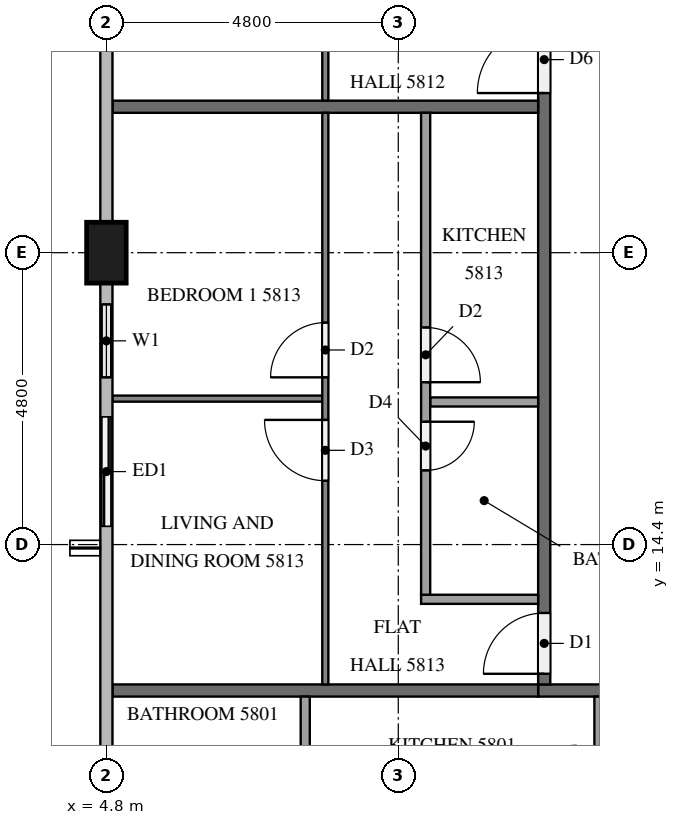
"""IFC4 building model, lengths in metres.
Left out: names, types, materials, properties, quantities, classifications, styles, units other than length and angle.
Written with IfcOpenShell. Run it as: python <this file> out.ifc"""

import sys

from ifc_helpers import new_model, si_unit, direction, frame, frame_2d, origin, origin_2d, place, context, subcontext, project, spatial, rectangle, extrude, element, fill, save


model = new_model("IFC4")
c1 = context("Model", 3, precision=1e-05, world=origin(), true_north=direction((0.0, 1.0)))
c2 = subcontext(c1, "Body", "Model", "MODEL_VIEW")
j1 = project(units=[si_unit("LENGTHUNIT", "METRE"), si_unit("PLANEANGLEUNIT", "RADIAN")], contexts=[c1])
p1 = place(None, origin())
s1 = spatial("IfcSite", under=j1, at=p1, CompositionType="ELEMENT")
p2 = place(p1, origin())
s2 = spatial("IfcBuilding", under=s1, at=p2, CompositionType="ELEMENT")
p3 = place(p2, frame((0.0, 0.0, 222.8)))
s3 = spatial("IfcBuildingStorey", under=s2, at=p3, CompositionType="ELEMENT", Elevation=222.8)
p4 = place(p3, frame((4.8, 19.2, 0.0), z_axis=(0.0, 0.0, 1.0), x_axis=(0.0, 1.0, 0.0)))
e1 = element("IfcColumn", 1, at=p4, inside=s3, PredefinedType="COLUMN", context=c2, shape_type="SweptSolid", body=[
    extrude(rectangle(XDim=1.0, YDim=0.65, at=origin_2d()), origin(), (0.0, 0.0, 1.0), 3.2),
])
p5 = place(p3, frame((4.8, 18.7, 0.0), z_axis=(0.0, 0.0, 1.0), x_axis=(0.0, -1.0, 0.0)))
e2 = element("IfcWall", 2, at=p5, inside=s3, PredefinedType="SOLIDWALL", context=c2, shape_type="SweptSolid", body=[
    extrude(rectangle(XDim=4.3, YDim=0.15, at=frame_2d((2.15, 0.0))), origin(), (0.0, 0.0, 1.0), 3.2),
])
p6 = place(p5, frame((0.35, 0.0, 0.9)))
e3 = element("IfcOpeningElement", 3, at=p6, cuts=e2, PredefinedType="OPENING", context=c2, shape_type="SweptSolid", body=[
    extrude(rectangle(XDim=1.2, YDim=1.4, at=frame_2d((0.6, 0.7))), frame((0.0, 0.085, 0.0), z_axis=(0.0, -1.0, 0.0), x_axis=(1.0, 0.0, 0.0)), (0.0, 0.0, 1.0), 0.17),
])
p7 = place(p5, frame((2.2, 0.0, 0.0)))
e4 = element("IfcOpeningElement", 4, at=p7, cuts=e2, PredefinedType="OPENING", context=c2, shape_type="SweptSolid", body=[
    extrude(rectangle(XDim=1.8, YDim=2.4, at=frame_2d((0.9, 1.2))), frame((0.0, 0.085, 0.0), z_axis=(0.0, -1.0, 0.0), x_axis=(1.0, 0.0, 0.0)), (0.0, 0.0, 1.0), 0.17),
])
p8 = place(p3, frame((50.5, 12.0, 0.0), z_axis=(0.0, 0.0, 1.0), x_axis=(-1.0, 0.0, 0.0)))
e5 = element("IfcWall", 5, at=p8, inside=s3, PredefinedType="PARTITIONING", context=c2, shape_type="SweptSolid", body=[
    extrude(rectangle(XDim=38.6, YDim=0.2, at=frame_2d((19.3, 0.0))), origin(), (0.0, 0.0, 1.0), 3.2),
])
p9 = place(p8, frame((36.375, 0.0, 0.0)))
e6 = element("IfcOpeningElement", 6, at=p9, cuts=e5, PredefinedType="OPENING", context=c2, shape_type="SweptSolid", body=[
    extrude(rectangle(XDim=1.0, YDim=2.1, at=frame_2d((0.5, 1.05))), frame((0.0, 0.11, 0.0), z_axis=(0.0, -1.0, 0.0), x_axis=(1.0, 0.0, 0.0)), (0.0, 0.0, 1.0), 0.22),
])
p10 = place(p8, frame((34.825, 0.0, 0.0)))
e7 = element("IfcOpeningElement", 7, at=p10, cuts=e5, PredefinedType="OPENING", context=c2, shape_type="SweptSolid", body=[
    extrude(rectangle(XDim=1.0, YDim=2.1, at=frame_2d((0.5, 1.05))), frame((0.0, 0.11, 0.0), z_axis=(0.0, -1.0, 0.0), x_axis=(1.0, 0.0, 0.0)), (0.0, 0.0, 1.0), 0.22),
])
p11 = place(p8, frame((20.375, 0.0, 0.0)))
e8 = element("IfcOpeningElement", 8, at=p11, cuts=e5, PredefinedType="OPENING", context=c2, shape_type="SweptSolid", body=[
    extrude(rectangle(XDim=1.1, YDim=2.1, at=frame_2d((0.55, 1.05))), frame((0.0, 0.11, 0.0), z_axis=(0.0, -1.0, 0.0), x_axis=(1.0, 0.0, 0.0)), (0.0, 0.0, 1.0), 0.22),
])
p12 = place(p8, frame((1.225, 0.0, 0.0)))
e9 = element("IfcOpeningElement", 9, at=p12, cuts=e5, PredefinedType="OPENING", context=c2, shape_type="SweptSolid", body=[
    extrude(rectangle(XDim=1.0, YDim=2.1, at=frame_2d((0.5, 1.05))), frame((0.0, 0.11, 0.0), z_axis=(0.0, -1.0, 0.0), x_axis=(1.0, 0.0, 0.0)), (0.0, 0.0, 1.0), 0.22),
])
p13 = place(p3, frame((12.0, 12.1, 0.0), z_axis=(0.0, 0.0, 1.0), x_axis=(0.0, 1.0, 0.0)))
e10 = element("IfcWall", 10, at=p13, inside=s3, PredefinedType="PARTITIONING", context=c2, shape_type="SweptSolid", body=[
    extrude(rectangle(XDim=28.6, YDim=0.2, at=frame_2d((14.3, 0.0))), origin(), (0.0, 0.0, 1.0), 3.2),
])
p14 = place(p13, frame((9.725, 0.0, 0.0)))
e11 = element("IfcOpeningElement", 11, at=p14, cuts=e10, PredefinedType="OPENING", context=c2, shape_type="SweptSolid", body=[
    extrude(rectangle(XDim=1.1, YDim=2.1, at=frame_2d((0.55, 1.05))), frame((0.0, 0.11, 0.0), z_axis=(0.0, -1.0, 0.0), x_axis=(1.0, 0.0, 0.0)), (0.0, 0.0, 1.0), 0.22),
])
p15 = place(p13, frame((0.175, 0.0, 0.0)))
e12 = element("IfcOpeningElement", 12, at=p15, cuts=e10, PredefinedType="OPENING", context=c2, shape_type="SweptSolid", body=[
    extrude(rectangle(XDim=1.0, YDim=2.1, at=frame_2d((0.5, 1.05))), frame((0.0, 0.11, 0.0), z_axis=(0.0, -1.0, 0.0), x_axis=(1.0, 0.0, 0.0)), (0.0, 0.0, 1.0), 0.22),
])
for number, where, z_axis, x_axis in (
    (13, (4.9, 12.0, 0.0), (0.0, 0.0, 1.0), (1.0, 0.0, 0.0)),
    (14, (4.9, 21.6, 0.0), (0.0, 0.0, 1.0), (1.0, 0.0, 0.0)),
):
    element("IfcWall", number, at=place(p3, frame(where, z_axis=z_axis, x_axis=x_axis)), inside=s3, PredefinedType="PARTITIONING", context=c2, shape_type="SweptSolid", body=[
        extrude(rectangle(XDim=7.0, YDim=0.2, at=frame_2d((3.5, 0.0))), origin(), (0.0, 0.0, 1.0), 3.2),
    ])
p16 = place(p3, frame((8.07, 11.9, 0.0), z_axis=(0.0, 0.0, 1.0), x_axis=(0.0, -1.0, 0.0)))
e15 = element("IfcWall", 15, at=p16, inside=s3, PredefinedType="PARTITIONING", context=c2, shape_type="SweptSolid", body=[
    extrude(rectangle(XDim=1.625, YDim=0.15, at=frame_2d((0.812, 0.0))), origin(), (0.0, 0.0, 1.0), 3.2),
])
p17 = place(p3, frame((12.9, 11.9, 0.0), z_axis=(0.0, 0.0, 1.0), x_axis=(0.0, -1.0, 0.0)))
e16 = element("IfcWall", 16, at=p17, inside=s3, PredefinedType="PARTITIONING", context=c2, shape_type="SweptSolid", body=[
    extrude(rectangle(XDim=1.775, YDim=0.15, at=frame_2d((0.887, 0.0))), origin(), (0.0, 0.0, 1.0), 3.2),
])
p18 = place(p3, frame((8.4, 21.7, 0.0), z_axis=(0.0, 0.0, 1.0), x_axis=(0.0, 1.0, 0.0)))
e17 = element("IfcWall", 17, at=p18, inside=s3, PredefinedType="PARTITIONING", context=c2, shape_type="SweptSolid", body=[
    extrude(rectangle(XDim=19.0, YDim=0.1, at=frame_2d((9.5, 0.0))), origin(), (0.0, 0.0, 1.0), 3.2),
])
p19 = place(p18, frame((3.45, 0.0, 0.0)))
e18 = element("IfcOpeningElement", 18, at=p19, cuts=e17, PredefinedType="OPENING", context=c2, shape_type="SweptSolid", body=[
    extrude(rectangle(XDim=0.9, YDim=2.1, at=frame_2d((0.45, 1.05))), frame((0.0, 0.06, 0.0), z_axis=(0.0, -1.0, 0.0), x_axis=(1.0, 0.0, 0.0)), (0.0, 0.0, 1.0), 0.12),
])
p20 = place(p18, frame((5.05, 0.0, 0.0)))
e19 = element("IfcOpeningElement", 19, at=p20, cuts=e17, PredefinedType="OPENING", context=c2, shape_type="SweptSolid", body=[
    extrude(rectangle(XDim=0.9, YDim=2.1, at=frame_2d((0.45, 1.05))), frame((0.0, 0.06, 0.0), z_axis=(0.0, -1.0, 0.0), x_axis=(1.0, 0.0, 0.0)), (0.0, 0.0, 1.0), 0.12),
])
p21 = place(p18, frame((13.05, 0.0, 0.0)))
e20 = element("IfcOpeningElement", 20, at=p21, cuts=e17, PredefinedType="OPENING", context=c2, shape_type="SweptSolid", body=[
    extrude(rectangle(XDim=0.9, YDim=2.1, at=frame_2d((0.45, 1.05))), frame((0.0, 0.06, 0.0), z_axis=(0.0, -1.0, 0.0), x_axis=(1.0, 0.0, 0.0)), (0.0, 0.0, 1.0), 0.12),
])
p22 = place(p18, frame((14.65, 0.0, 0.0)))
e21 = element("IfcOpeningElement", 21, at=p22, cuts=e17, PredefinedType="OPENING", context=c2, shape_type="SweptSolid", body=[
    extrude(rectangle(XDim=1.0, YDim=2.1, at=frame_2d((0.5, 1.05))), frame((0.0, 0.06, 0.0), z_axis=(0.0, -1.0, 0.0), x_axis=(1.0, 0.0, 0.0)), (0.0, 0.0, 1.0), 0.12),
])
p23 = place(p3, frame((8.35, 16.8, 0.0), z_axis=(0.0, 0.0, 1.0), x_axis=(-1.0, 0.0, 0.0)))
e22 = element("IfcWall", 22, at=p23, inside=s3, PredefinedType="PARTITIONING", context=c2, shape_type="SweptSolid", body=[
    extrude(rectangle(XDim=3.45, YDim=0.1, at=frame_2d((1.725, 0.0))), origin(), (0.0, 0.0, 1.0), 3.2),
])
p24 = place(p3, frame((8.4, 12.1, 0.0), z_axis=(0.0, 0.0, 1.0), x_axis=(0.0, 1.0, 0.0)))
e23 = element("IfcWall", 23, at=p24, inside=s3, PredefinedType="PARTITIONING", context=c2, shape_type="SweptSolid", body=[
    extrude(rectangle(XDim=9.4, YDim=0.1, at=frame_2d((4.7, 0.0))), origin(), (0.0, 0.0, 1.0), 3.2),
])
p25 = place(p24, frame((3.35, 0.0, 0.0)))
e24 = element("IfcOpeningElement", 24, at=p25, cuts=e23, PredefinedType="OPENING", context=c2, shape_type="SweptSolid", body=[
    extrude(rectangle(XDim=1.0, YDim=2.1, at=frame_2d((0.5, 1.05))), frame((0.0, 0.06, 0.0), z_axis=(0.0, -1.0, 0.0), x_axis=(1.0, 0.0, 0.0)), (0.0, 0.0, 1.0), 0.12),
])
p26 = place(p24, frame((5.05, 0.0, 0.0)))
e25 = element("IfcOpeningElement", 25, at=p26, cuts=e23, PredefinedType="OPENING", context=c2, shape_type="SweptSolid", body=[
    extrude(rectangle(XDim=0.9, YDim=2.1, at=frame_2d((0.45, 1.05))), frame((0.0, 0.06, 0.0), z_axis=(0.0, -1.0, 0.0), x_axis=(1.0, 0.0, 0.0)), (0.0, 0.0, 1.0), 0.12),
])
p27 = place(p3, frame((11.9, 16.745, 0.0), z_axis=(0.0, 0.0, 1.0), x_axis=(-1.0, 0.0, 0.0)))
e26 = element("IfcWall", 26, at=p27, inside=s3, PredefinedType="PARTITIONING", context=c2, shape_type="SweptSolid", body=[
    extrude(rectangle(XDim=1.775, YDim=0.15, at=frame_2d((0.887, 0.0))), origin(), (0.0, 0.0, 1.0), 3.2),
])
p28 = place(p3, frame((11.9, 13.5, 0.0), z_axis=(0.0, 0.0, 1.0), x_axis=(-1.0, 0.0, 0.0)))
e27 = element("IfcWall", 27, at=p28, inside=s3, PredefinedType="PARTITIONING", context=c2, shape_type="SweptSolid", body=[
    extrude(rectangle(XDim=1.925, YDim=0.15, at=frame_2d((0.962, 0.0))), origin(), (0.0, 0.0, 1.0), 3.2),
])
p29 = place(p3, frame((10.05, 21.5, 0.0), z_axis=(0.0, 0.0, 1.0), x_axis=(0.0, -1.0, 0.0)))
e28 = element("IfcWall", 28, at=p29, inside=s3, PredefinedType="PARTITIONING", context=c2, shape_type="SweptSolid", body=[
    extrude(rectangle(XDim=7.925, YDim=0.15, at=frame_2d((3.962, 0.0))), origin(), (0.0, 0.0, 1.0), 3.2),
])
p30 = place(p29, frame((5.08, 0.0, 0.0)))
e29 = element("IfcOpeningElement", 29, at=p30, cuts=e28, PredefinedType="OPENING", context=c2, shape_type="SweptSolid", body=[
    extrude(rectangle(XDim=0.8, YDim=2.1, at=frame_2d((0.4, 1.05))), frame((0.0, 0.085, 0.0), z_axis=(0.0, -1.0, 0.0), x_axis=(1.0, 0.0, 0.0)), (0.0, 0.0, 1.0), 0.17),
])
p31 = place(p29, frame((3.53, 0.0, 0.0)))
e30 = element("IfcOpeningElement", 30, at=p31, cuts=e28, PredefinedType="OPENING", context=c2, shape_type="SweptSolid", body=[
    extrude(rectangle(XDim=0.9, YDim=2.1, at=frame_2d((0.45, 1.05))), frame((0.0, 0.085, 0.0), z_axis=(0.0, -1.0, 0.0), x_axis=(1.0, 0.0, 0.0)), (0.0, 0.0, 1.0), 0.17),
])
p32 = place(p6, origin())
e31 = element("IfcWindow", 31, at=p32, inside=s3, PartitioningType="SINGLE_PANEL", PredefinedType="WINDOW", context=c2, shape_type="SweptSolid", body=[
    extrude(rectangle(XDim=1.2, YDim=1.4, at=frame_2d((0.6, 0.7))), frame((0.0, 0.03, 0.0), z_axis=(0.0, -1.0, 0.0), x_axis=(1.0, 0.0, 0.0)), (0.0, 0.0, 1.0), 0.06),
])
fill(e3, e31)
p33 = place(p7, origin())
e32 = element("IfcDoor", 32, at=p33, inside=s3, OperationType="SLIDING_TO_LEFT", PredefinedType="DOOR", context=c2, shape_type="SweptSolid", body=[
    extrude(rectangle(XDim=1.8, YDim=2.4, at=frame_2d((0.9, 1.2))), frame((0.0, 0.025, 0.0), z_axis=(0.0, -1.0, 0.0), x_axis=(1.0, 0.0, 0.0)), (0.0, 0.0, 1.0), 0.05),
])
fill(e4, e32)
p34 = place(p14, origin())
e33 = element("IfcDoor", 33, at=p34, inside=s3, OperationType="SINGLE_SWING_LEFT", PredefinedType="DOOR", context=c2, shape_type="SweptSolid", body=[
    extrude(rectangle(XDim=1.1, YDim=2.1, at=frame_2d((0.55, 1.05))), frame((0.0, 0.025, 0.0), z_axis=(0.0, -1.0, 0.0), x_axis=(1.0, 0.0, 0.0)), (0.0, 0.0, 1.0), 0.05),
])
fill(e11, e33)
p35 = place(p15, origin())
e34 = element("IfcDoor", 34, at=p35, inside=s3, OperationType="SINGLE_SWING_LEFT", PredefinedType="DOOR", context=c2, shape_type="SweptSolid", body=[
    extrude(rectangle(XDim=1.0, YDim=2.1, at=frame_2d((0.5, 1.05))), frame((0.0, 0.025, 0.0), z_axis=(0.0, -1.0, 0.0), x_axis=(1.0, 0.0, 0.0)), (0.0, 0.0, 1.0), 0.05),
])
fill(e12, e34)
p36 = place(p25, origin())
e35 = element("IfcDoor", 35, at=p36, inside=s3, OperationType="SINGLE_SWING_RIGHT", PredefinedType="DOOR", context=c2, shape_type="SweptSolid", body=[
    extrude(rectangle(XDim=1.0, YDim=2.1, at=frame_2d((0.5, 1.05))), frame((0.0, 0.025, 0.0), z_axis=(0.0, -1.0, 0.0), x_axis=(1.0, 0.0, 0.0)), (0.0, 0.0, 1.0), 0.05),
])
fill(e24, e35)
p37 = place(p26, origin())
e36 = element("IfcDoor", 36, at=p37, inside=s3, OperationType="SINGLE_SWING_LEFT", PredefinedType="DOOR", context=c2, shape_type="SweptSolid", body=[
    extrude(rectangle(XDim=0.9, YDim=2.1, at=frame_2d((0.45, 1.05))), frame((0.0, 0.025, 0.0), z_axis=(0.0, -1.0, 0.0), x_axis=(1.0, 0.0, 0.0)), (0.0, 0.0, 1.0), 0.05),
])
fill(e25, e36)
p38 = place(p30, origin())
e37 = element("IfcDoor", 37, at=p38, inside=s3, OperationType="SINGLE_SWING_LEFT", PredefinedType="DOOR", context=c2, shape_type="SweptSolid", body=[
    extrude(rectangle(XDim=0.8, YDim=2.1, at=frame_2d((0.4, 1.05))), frame((0.0, 0.025, 0.0), z_axis=(0.0, -1.0, 0.0), x_axis=(1.0, 0.0, 0.0)), (0.0, 0.0, 1.0), 0.05),
])
fill(e29, e37)
p39 = place(p31, origin())
e38 = element("IfcDoor", 38, at=p39, inside=s3, OperationType="SINGLE_SWING_RIGHT", PredefinedType="DOOR", context=c2, shape_type="SweptSolid", body=[
    extrude(rectangle(XDim=0.9, YDim=2.1, at=frame_2d((0.45, 1.05))), frame((0.0, 0.025, 0.0), z_axis=(0.0, -1.0, 0.0), x_axis=(1.0, 0.0, 0.0)), (0.0, 0.0, 1.0), 0.05),
])
fill(e30, e38)
save(model, sys.argv[1])
